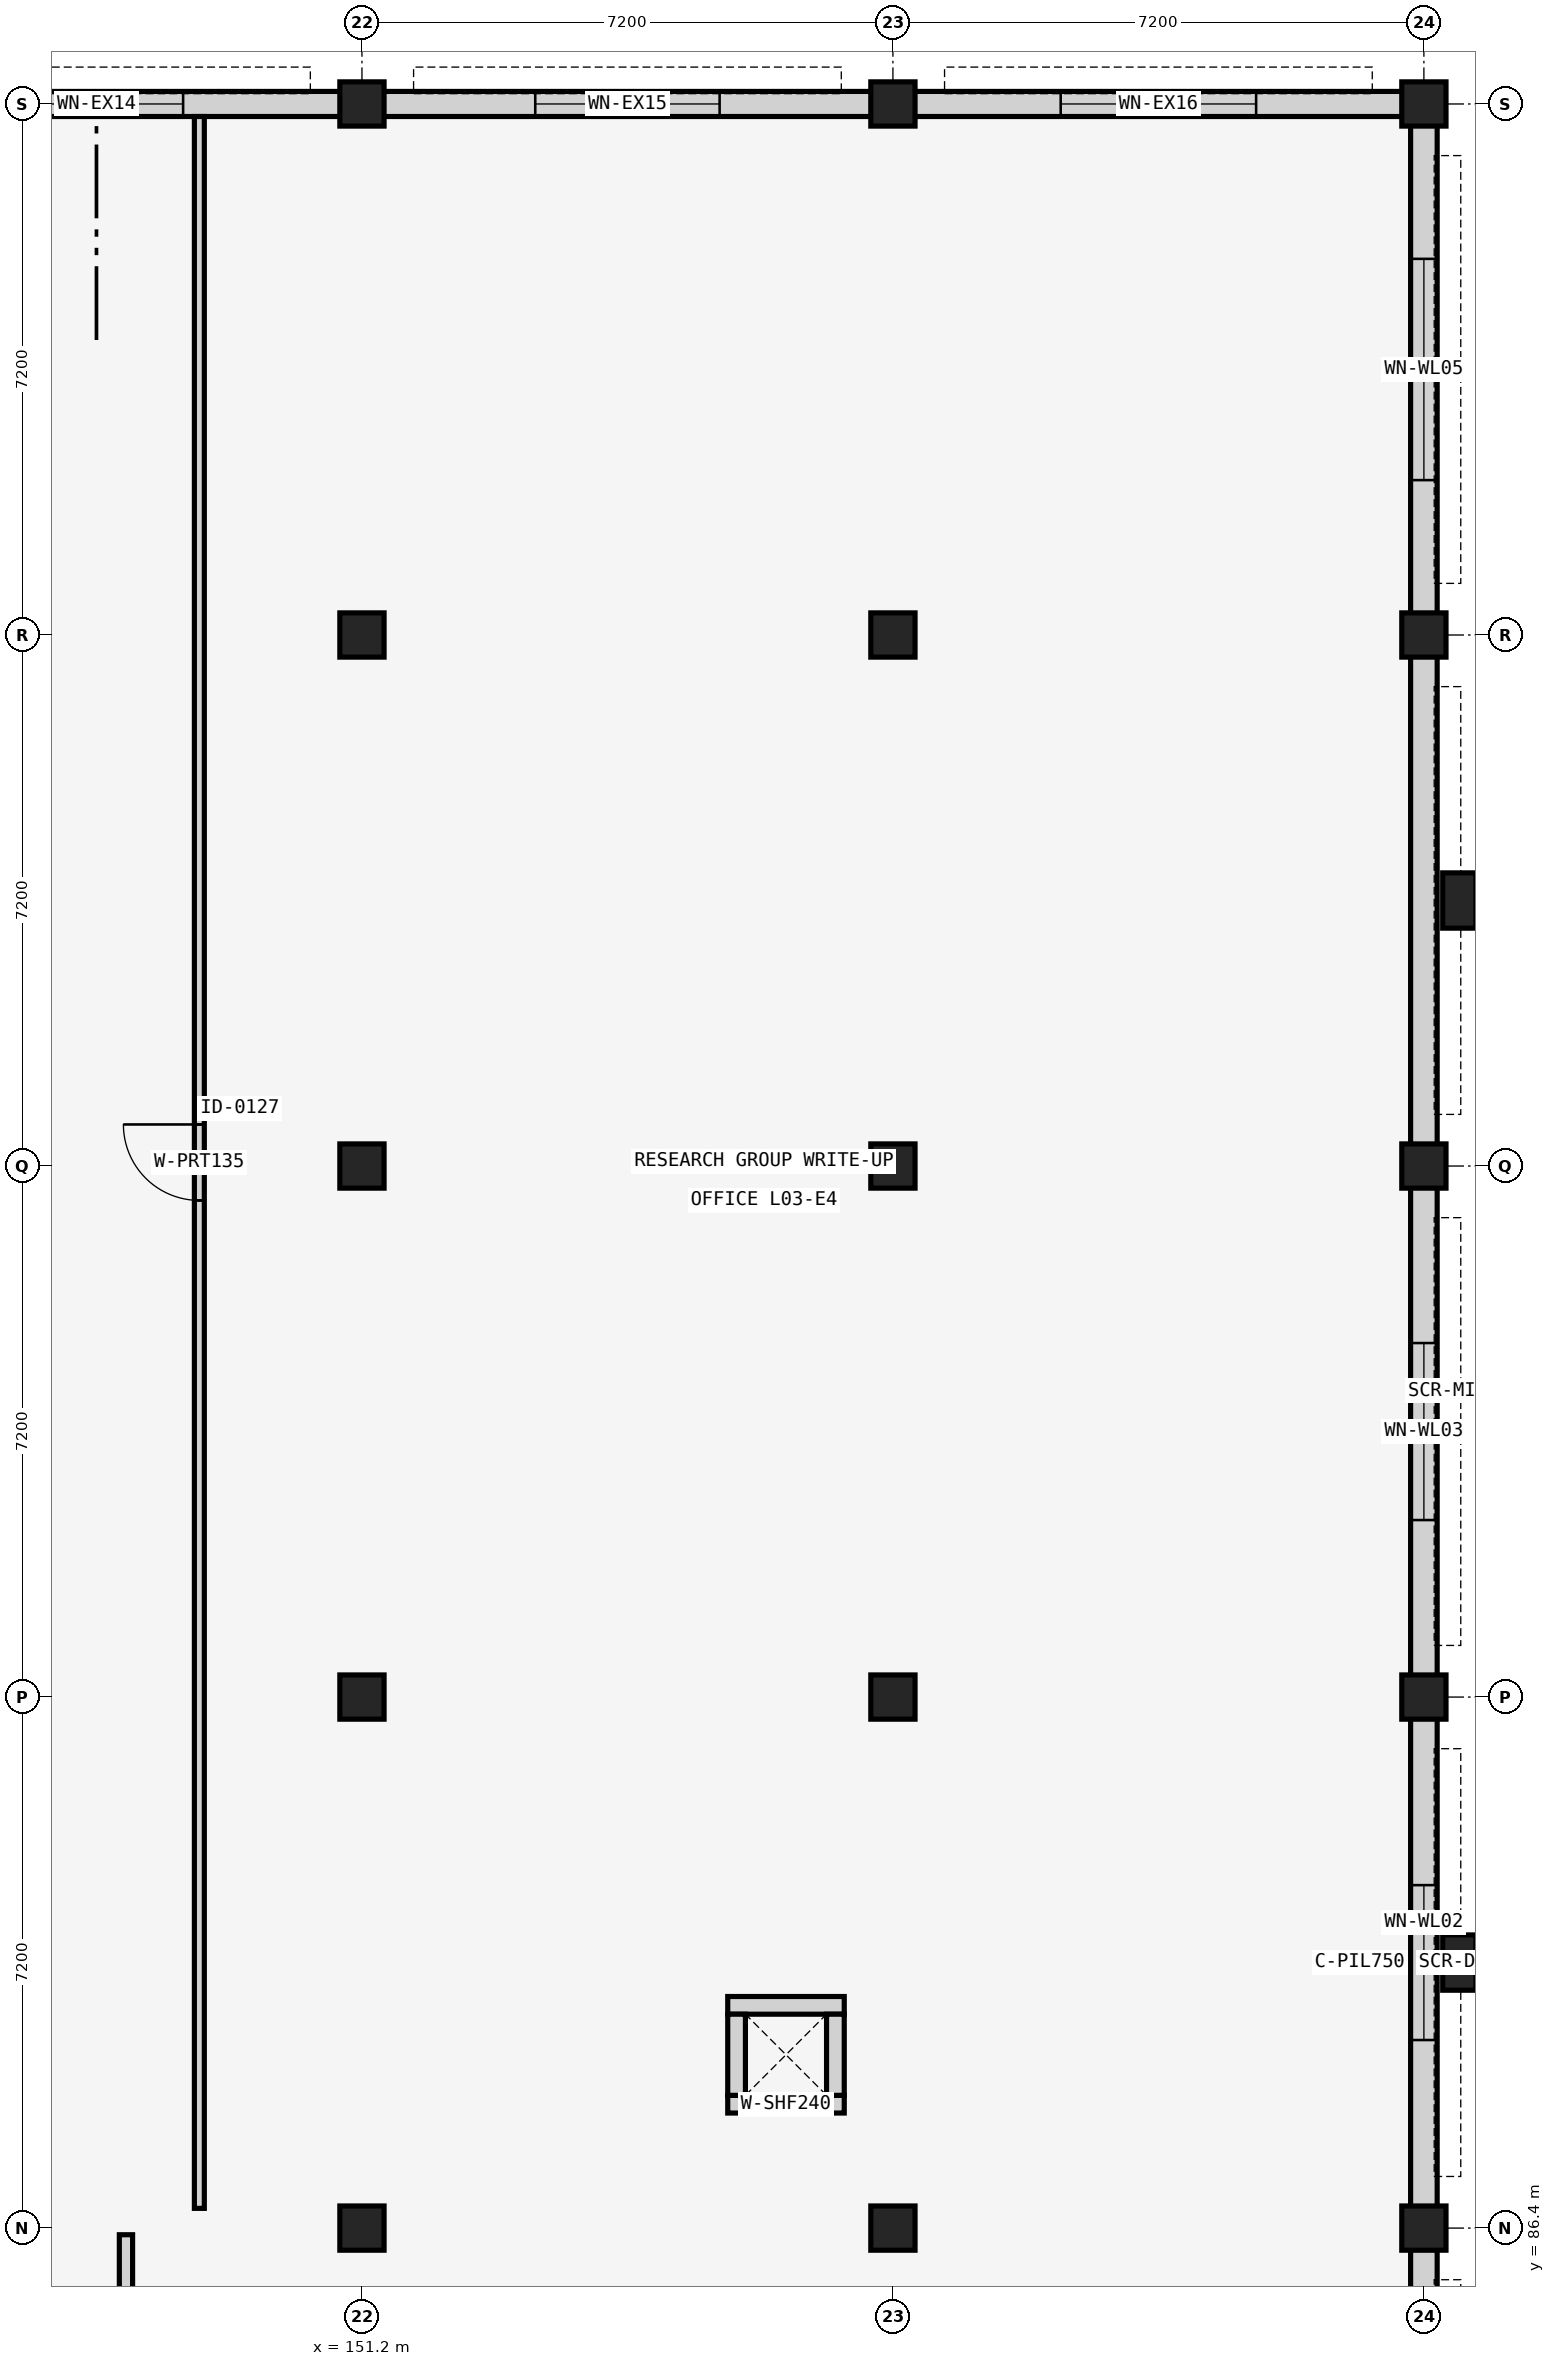
"""IFC4 building model, lengths in metres.
Left out: names, types, materials, properties, quantities, classifications, styles, units other than length and angle.
Written with IfcOpenShell. Run it as: python <this file> out.ifc"""

import sys

from ifc_helpers import new_model, si_unit, direction, frame, frame_2d, origin, origin_2d, place, context, subcontext, project, spatial, rectangle, extrude, element, fill, save


model = new_model("IFC4")
c1 = context("Model", 3, precision=1e-05, world=origin(), true_north=direction((0.0, 1.0)))
c2 = subcontext(c1, "Body", "Model", "MODEL_VIEW")
j1 = project(units=[si_unit("LENGTHUNIT", "METRE"), si_unit("PLANEANGLEUNIT", "RADIAN")], contexts=[c1])
p1 = place(None, origin())
s1 = spatial("IfcSite", under=j1, at=p1, CompositionType="ELEMENT")
p2 = place(p1, origin())
s2 = spatial("IfcBuilding", under=s1, at=p2, CompositionType="ELEMENT")
p3 = place(p2, frame((0.0, 0.0, 13.12)))
s3 = spatial("IfcBuildingStorey", under=s2, at=p3, CompositionType="ELEMENT", Elevation=13.12)
for number, where, z_axis, x_axis in (
    (1, (151.2, 86.4, 0.0), (0.0, 0.0, 1.0), (1.0, 0.0, 0.0)),
    (2, (151.2, 93.6, 0.0), (0.0, 0.0, 1.0), (1.0, 0.0, 0.0)),
    (3, (151.2, 100.8, 0.0), (0.0, 0.0, 1.0), (1.0, 0.0, 0.0)),
    (4, (151.2, 108.0, 0.0), (0.0, 0.0, 1.0), (1.0, 0.0, 0.0)),
    (5, (151.2, 115.2, 0.0), (0.0, 0.0, 1.0), (1.0, 0.0, 0.0)),
    (6, (158.4, 86.4, 0.0), (0.0, 0.0, 1.0), (1.0, 0.0, 0.0)),
    (7, (158.4, 93.6, 0.0), (0.0, 0.0, 1.0), (1.0, 0.0, 0.0)),
    (8, (158.4, 100.8, 0.0), (0.0, 0.0, 1.0), (1.0, 0.0, 0.0)),
    (9, (158.4, 108.0, 0.0), (0.0, 0.0, 1.0), (1.0, 0.0, 0.0)),
    (10, (158.4, 115.2, 0.0), (0.0, 0.0, 1.0), (1.0, 0.0, 0.0)),
    (11, (165.6, 86.4, 0.0), (0.0, 0.0, 1.0), (1.0, 0.0, 0.0)),
    (12, (165.6, 93.6, 0.0), (0.0, 0.0, 1.0), (1.0, 0.0, 0.0)),
    (13, (165.6, 100.8, 0.0), (0.0, 0.0, 1.0), (1.0, 0.0, 0.0)),
    (14, (165.6, 108.0, 0.0), (0.0, 0.0, 1.0), (1.0, 0.0, 0.0)),
    (15, (165.6, 115.2, 0.0), (0.0, 0.0, 1.0), (1.0, 0.0, 0.0)),
):
    element("IfcColumn", number, at=place(p3, frame(where, z_axis=z_axis, x_axis=x_axis)), inside=s3, PredefinedType="COLUMN", context=c2, shape_type="SweptSolid", body=[
        extrude(rectangle(XDim=0.6, YDim=0.6, at=origin_2d()), origin(), (0.0, 0.0, 1.0), 4.16),
    ])
for number, where, z_axis, x_axis in (
    (16, (166.08, 90.0, 0.0), (0.0, 0.0, 1.0), (1.0, 0.0, 0.0)),
    (17, (166.08, 104.4, 0.0), (0.0, 0.0, 1.0), (1.0, 0.0, 0.0)),
):
    element("IfcColumn", number, at=place(p3, frame(where, z_axis=z_axis, x_axis=x_axis)), inside=s3, PredefinedType="PILASTER", context=c2, shape_type="SweptSolid", body=[
        extrude(rectangle(XDim=0.45, YDim=0.75, at=origin_2d()), origin(), (0.0, 0.0, 1.0), 4.16),
    ])
p4 = place(p3, frame((165.6, 79.49, 0.0), z_axis=(0.0, 0.0, 1.0), x_axis=(0.0, 1.0, 0.0)))
e18 = element("IfcWall", 18, at=p4, inside=s3, PredefinedType="SOLIDWALL", context=c2, shape_type="SweptSolid", body=[
    extrude(rectangle(XDim=6.62, YDim=0.36, at=frame_2d((3.31, 0.0))), origin(), (0.0, 0.0, 1.0), 3.16),
])
p5 = place(p3, frame((165.6, 86.69, 0.0), z_axis=(0.0, 0.0, 1.0), x_axis=(0.0, 1.0, 0.0)))
e19 = element("IfcWall", 19, at=p5, inside=s3, PredefinedType="SOLIDWALL", context=c2, shape_type="SweptSolid", body=[
    extrude(rectangle(XDim=6.62, YDim=0.36, at=frame_2d((3.31, 0.0))), origin(), (0.0, 0.0, 1.0), 3.16),
])
p6 = place(p5, frame((2.26, 0.0, 0.9)))
e20 = element("IfcOpeningElement", 20, at=p6, cuts=e19, PredefinedType="OPENING", context=c2, shape_type="SweptSolid", body=[
    extrude(rectangle(XDim=2.1, YDim=2.1, at=frame_2d((1.05, 1.05))), frame((0.0, 0.19, 0.0), z_axis=(0.0, -1.0, 0.0), x_axis=(1.0, 0.0, 0.0)), (0.0, 0.0, 1.0), 0.38),
])
p7 = place(p3, frame((165.6, 93.89, 0.0), z_axis=(0.0, 0.0, 1.0), x_axis=(0.0, 1.0, 0.0)))
e21 = element("IfcWall", 21, at=p7, inside=s3, PredefinedType="SOLIDWALL", context=c2, shape_type="SweptSolid", body=[
    extrude(rectangle(XDim=6.62, YDim=0.36, at=frame_2d((3.31, 0.0))), origin(), (0.0, 0.0, 1.0), 3.16),
])
p8 = place(p7, frame((2.11, 0.0, 0.9)))
e22 = element("IfcOpeningElement", 22, at=p8, cuts=e21, PredefinedType="OPENING", context=c2, shape_type="SweptSolid", body=[
    extrude(rectangle(XDim=2.4, YDim=2.1, at=frame_2d((1.2, 1.05))), frame((0.0, 0.19, 0.0), z_axis=(0.0, -1.0, 0.0), x_axis=(1.0, 0.0, 0.0)), (0.0, 0.0, 1.0), 0.38),
])
p9 = place(p3, frame((165.6, 101.09, 0.0), z_axis=(0.0, 0.0, 1.0), x_axis=(0.0, 1.0, 0.0)))
e23 = element("IfcWall", 23, at=p9, inside=s3, PredefinedType="SOLIDWALL", context=c2, shape_type="SweptSolid", body=[
    extrude(rectangle(XDim=6.62, YDim=0.36, at=frame_2d((3.31, 0.0))), origin(), (0.0, 0.0, 1.0), 3.16),
])
p10 = place(p3, frame((165.6, 108.29, 0.0), z_axis=(0.0, 0.0, 1.0), x_axis=(0.0, 1.0, 0.0)))
e24 = element("IfcWall", 24, at=p10, inside=s3, PredefinedType="SOLIDWALL", context=c2, shape_type="SweptSolid", body=[
    extrude(rectangle(XDim=6.62, YDim=0.36, at=frame_2d((3.31, 0.0))), origin(), (0.0, 0.0, 1.0), 3.16),
])
p11 = place(p10, frame((1.81, 0.0, 0.9)))
e25 = element("IfcOpeningElement", 25, at=p11, cuts=e24, PredefinedType="OPENING", context=c2, shape_type="SweptSolid", body=[
    extrude(rectangle(XDim=3.0, YDim=2.1, at=frame_2d((1.5, 1.05))), frame((0.0, 0.19, 0.0), z_axis=(0.0, -1.0, 0.0), x_axis=(1.0, 0.0, 0.0)), (0.0, 0.0, 1.0), 0.38),
])
p12 = place(p3, frame((144.29, 115.2, 0.0), z_axis=(0.0, 0.0, 1.0), x_axis=(1.0, 0.0, 0.0)))
e26 = element("IfcWall", 26, at=p12, inside=s3, PredefinedType="SOLIDWALL", context=c2, shape_type="SweptSolid", body=[
    extrude(rectangle(XDim=6.62, YDim=0.34, at=frame_2d((3.31, 0.0))), origin(), (0.0, 0.0, 1.0), 3.21),
])
p13 = place(p12, frame((2.135, 0.0, 0.95)))
e27 = element("IfcOpeningElement", 27, at=p13, cuts=e26, PredefinedType="OPENING", context=c2, shape_type="SweptSolid", body=[
    extrude(rectangle(XDim=2.35, YDim=1.6, at=frame_2d((1.175, 0.8))), frame((0.0, 0.18, 0.0), z_axis=(0.0, -1.0, 0.0), x_axis=(1.0, 0.0, 0.0)), (0.0, 0.0, 1.0), 0.36),
])
p14 = place(p3, frame((151.49, 115.2, 0.0), z_axis=(0.0, 0.0, 1.0), x_axis=(1.0, 0.0, 0.0)))
e28 = element("IfcWall", 28, at=p14, inside=s3, PredefinedType="SOLIDWALL", context=c2, shape_type="SweptSolid", body=[
    extrude(rectangle(XDim=6.62, YDim=0.34, at=frame_2d((3.31, 0.0))), origin(), (0.0, 0.0, 1.0), 3.21),
])
p15 = place(p14, frame((2.06, 0.0, 0.95)))
e29 = element("IfcOpeningElement", 29, at=p15, cuts=e28, PredefinedType="OPENING", context=c2, shape_type="SweptSolid", body=[
    extrude(rectangle(XDim=2.5, YDim=1.6, at=frame_2d((1.25, 0.8))), frame((0.0, 0.18, 0.0), z_axis=(0.0, -1.0, 0.0), x_axis=(1.0, 0.0, 0.0)), (0.0, 0.0, 1.0), 0.36),
])
p16 = place(p3, frame((158.69, 115.2, 0.0), z_axis=(0.0, 0.0, 1.0), x_axis=(1.0, 0.0, 0.0)))
e30 = element("IfcWall", 30, at=p16, inside=s3, PredefinedType="SOLIDWALL", context=c2, shape_type="SweptSolid", body=[
    extrude(rectangle(XDim=6.62, YDim=0.34, at=frame_2d((3.31, 0.0))), origin(), (0.0, 0.0, 1.0), 3.21),
])
p17 = place(p16, frame((1.985, 0.0, 0.95)))
e31 = element("IfcOpeningElement", 31, at=p17, cuts=e30, PredefinedType="OPENING", context=c2, shape_type="SweptSolid", body=[
    extrude(rectangle(XDim=2.65, YDim=1.6, at=frame_2d((1.325, 0.8))), frame((0.0, 0.18, 0.0), z_axis=(0.0, -1.0, 0.0), x_axis=(1.0, 0.0, 0.0)), (0.0, 0.0, 1.0), 0.36),
])
p18 = place(p3, frame((148.0, 71.89, 0.0), z_axis=(0.0, 0.0, 1.0), x_axis=(0.0, 1.0, 0.0)))
e32 = element("IfcWall", 32, at=p18, inside=s3, PredefinedType="PARTITIONING", context=c2, shape_type="SweptSolid", body=[
    extrude(rectangle(XDim=14.42, YDim=0.18, at=frame_2d((7.21, 0.0))), origin(), (0.0, 0.0, 1.0), 3.16),
])
p19 = place(p18, frame((6.725, 0.0, 0.0)))
e33 = element("IfcOpeningElement", 33, at=p19, cuts=e32, PredefinedType="OPENING", context=c2, shape_type="SweptSolid", body=[
    extrude(rectangle(XDim=0.97, YDim=2.08, at=frame_2d((0.485, 1.04))), frame((0.0, 0.1, 0.0), z_axis=(0.0, -1.0, 0.0), x_axis=(1.0, 0.0, 0.0)), (0.0, 0.0, 1.0), 0.2),
])
p20 = place(p3, frame((148.995, 86.667, 0.0), z_axis=(0.0, 0.0, 1.0), x_axis=(0.0, 1.0, 0.0)))
e34 = element("IfcWall", 34, at=p20, inside=s3, PredefinedType="PARTITIONING", context=c2, shape_type="SweptSolid", body=[
    extrude(rectangle(XDim=28.363, YDim=0.135, at=frame_2d((14.181, 0.0))), origin(), (0.0, 0.0, 1.0), 3.16),
])
p21 = place(p20, frame((13.666, 0.0, 0.0)))
e35 = element("IfcOpeningElement", 35, at=p21, cuts=e34, PredefinedType="OPENING", context=c2, shape_type="SweptSolid", body=[
    extrude(rectangle(XDim=1.03, YDim=2.08, at=frame_2d((0.515, 1.04))), frame((0.0, 0.078, 0.0), z_axis=(0.0, -1.0, 0.0), x_axis=(1.0, 0.0, 0.0)), (0.0, 0.0, 1.0), 0.155),
])
for number, where, z_axis, x_axis in (
    (36, (156.16, 88.08, 0.0), (0.0, 0.0, 1.0), (1.0, 0.0, 0.0)),
    (37, (156.16, 89.42, 0.0), (0.0, 0.0, 1.0), (1.0, 0.0, 0.0)),
):
    element("IfcWall", number, at=place(p3, frame(where, z_axis=z_axis, x_axis=x_axis)), inside=s3, PredefinedType="SOLIDWALL", context=c2, shape_type="SweptSolid", body=[
        extrude(rectangle(XDim=1.58, YDim=0.24, at=frame_2d((0.79, 0.0))), origin(), (0.0, 0.0, 1.0), 3.81),
    ])
for number, where, z_axis, x_axis in (
    (38, (156.28, 88.2, 0.0), (0.0, 0.0, 1.0), (0.0, 1.0, 0.0)),
    (39, (157.62, 88.2, 0.0), (0.0, 0.0, 1.0), (0.0, 1.0, 0.0)),
):
    element("IfcWall", number, at=place(p3, frame(where, z_axis=z_axis, x_axis=x_axis)), inside=s3, PredefinedType="SOLIDWALL", context=c2, shape_type="SweptSolid", body=[
        extrude(rectangle(XDim=1.1, YDim=0.24, at=frame_2d((0.55, 0.0))), origin(), (0.0, 0.0, 1.0), 3.81),
    ])
p22 = place(p6, origin())
e40 = element("IfcWindow", 40, at=p22, inside=s3, PartitioningType="SINGLE_PANEL", PredefinedType="WINDOW", context=c2, shape_type="SweptSolid", body=[
    extrude(rectangle(XDim=2.1, YDim=2.1, at=frame_2d((1.05, 1.05))), frame((0.0, 0.03, 0.0), z_axis=(0.0, -1.0, 0.0), x_axis=(1.0, 0.0, 0.0)), (0.0, 0.0, 1.0), 0.06),
])
fill(e20, e40)
p23 = place(p8, origin())
e41 = element("IfcWindow", 41, at=p23, inside=s3, PartitioningType="SINGLE_PANEL", PredefinedType="WINDOW", context=c2, shape_type="SweptSolid", body=[
    extrude(rectangle(XDim=2.4, YDim=2.1, at=frame_2d((1.2, 1.05))), frame((0.0, 0.03, 0.0), z_axis=(0.0, -1.0, 0.0), x_axis=(1.0, 0.0, 0.0)), (0.0, 0.0, 1.0), 0.06),
])
fill(e22, e41)
p24 = place(p11, origin())
e42 = element("IfcWindow", 42, at=p24, inside=s3, PartitioningType="SINGLE_PANEL", PredefinedType="WINDOW", context=c2, shape_type="SweptSolid", body=[
    extrude(rectangle(XDim=3.0, YDim=2.1, at=frame_2d((1.5, 1.05))), frame((0.0, 0.03, 0.0), z_axis=(0.0, -1.0, 0.0), x_axis=(1.0, 0.0, 0.0)), (0.0, 0.0, 1.0), 0.06),
])
fill(e25, e42)
p25 = place(p13, origin())
e43 = element("IfcWindow", 43, at=p25, inside=s3, PartitioningType="SINGLE_PANEL", PredefinedType="WINDOW", context=c2, shape_type="SweptSolid", body=[
    extrude(rectangle(XDim=2.35, YDim=1.6, at=frame_2d((1.175, 0.8))), frame((0.0, 0.03, 0.0), z_axis=(0.0, -1.0, 0.0), x_axis=(1.0, 0.0, 0.0)), (0.0, 0.0, 1.0), 0.06),
])
fill(e27, e43)
p26 = place(p15, origin())
e44 = element("IfcWindow", 44, at=p26, inside=s3, PartitioningType="SINGLE_PANEL", PredefinedType="WINDOW", context=c2, shape_type="SweptSolid", body=[
    extrude(rectangle(XDim=2.5, YDim=1.6, at=frame_2d((1.25, 0.8))), frame((0.0, 0.03, 0.0), z_axis=(0.0, -1.0, 0.0), x_axis=(1.0, 0.0, 0.0)), (0.0, 0.0, 1.0), 0.06),
])
fill(e29, e44)
p27 = place(p17, origin())
e45 = element("IfcWindow", 45, at=p27, inside=s3, PartitioningType="SINGLE_PANEL", PredefinedType="WINDOW", context=c2, shape_type="SweptSolid", body=[
    extrude(rectangle(XDim=2.65, YDim=1.6, at=frame_2d((1.325, 0.8))), frame((0.0, 0.03, 0.0), z_axis=(0.0, -1.0, 0.0), x_axis=(1.0, 0.0, 0.0)), (0.0, 0.0, 1.0), 0.06),
])
fill(e31, e45)
p28 = place(p21, origin())
e46 = element("IfcDoor", 46, at=p28, inside=s3, OperationType="SINGLE_SWING_RIGHT", PredefinedType="DOOR", context=c2, shape_type="SweptSolid", body=[
    extrude(rectangle(XDim=1.03, YDim=2.08, at=frame_2d((0.515, 1.04))), frame((0.0, 0.025, 0.0), z_axis=(0.0, -1.0, 0.0), x_axis=(1.0, 0.0, 0.0)), (0.0, 0.0, 1.0), 0.05),
])
fill(e35, e46)
save(model, sys.argv[1])
